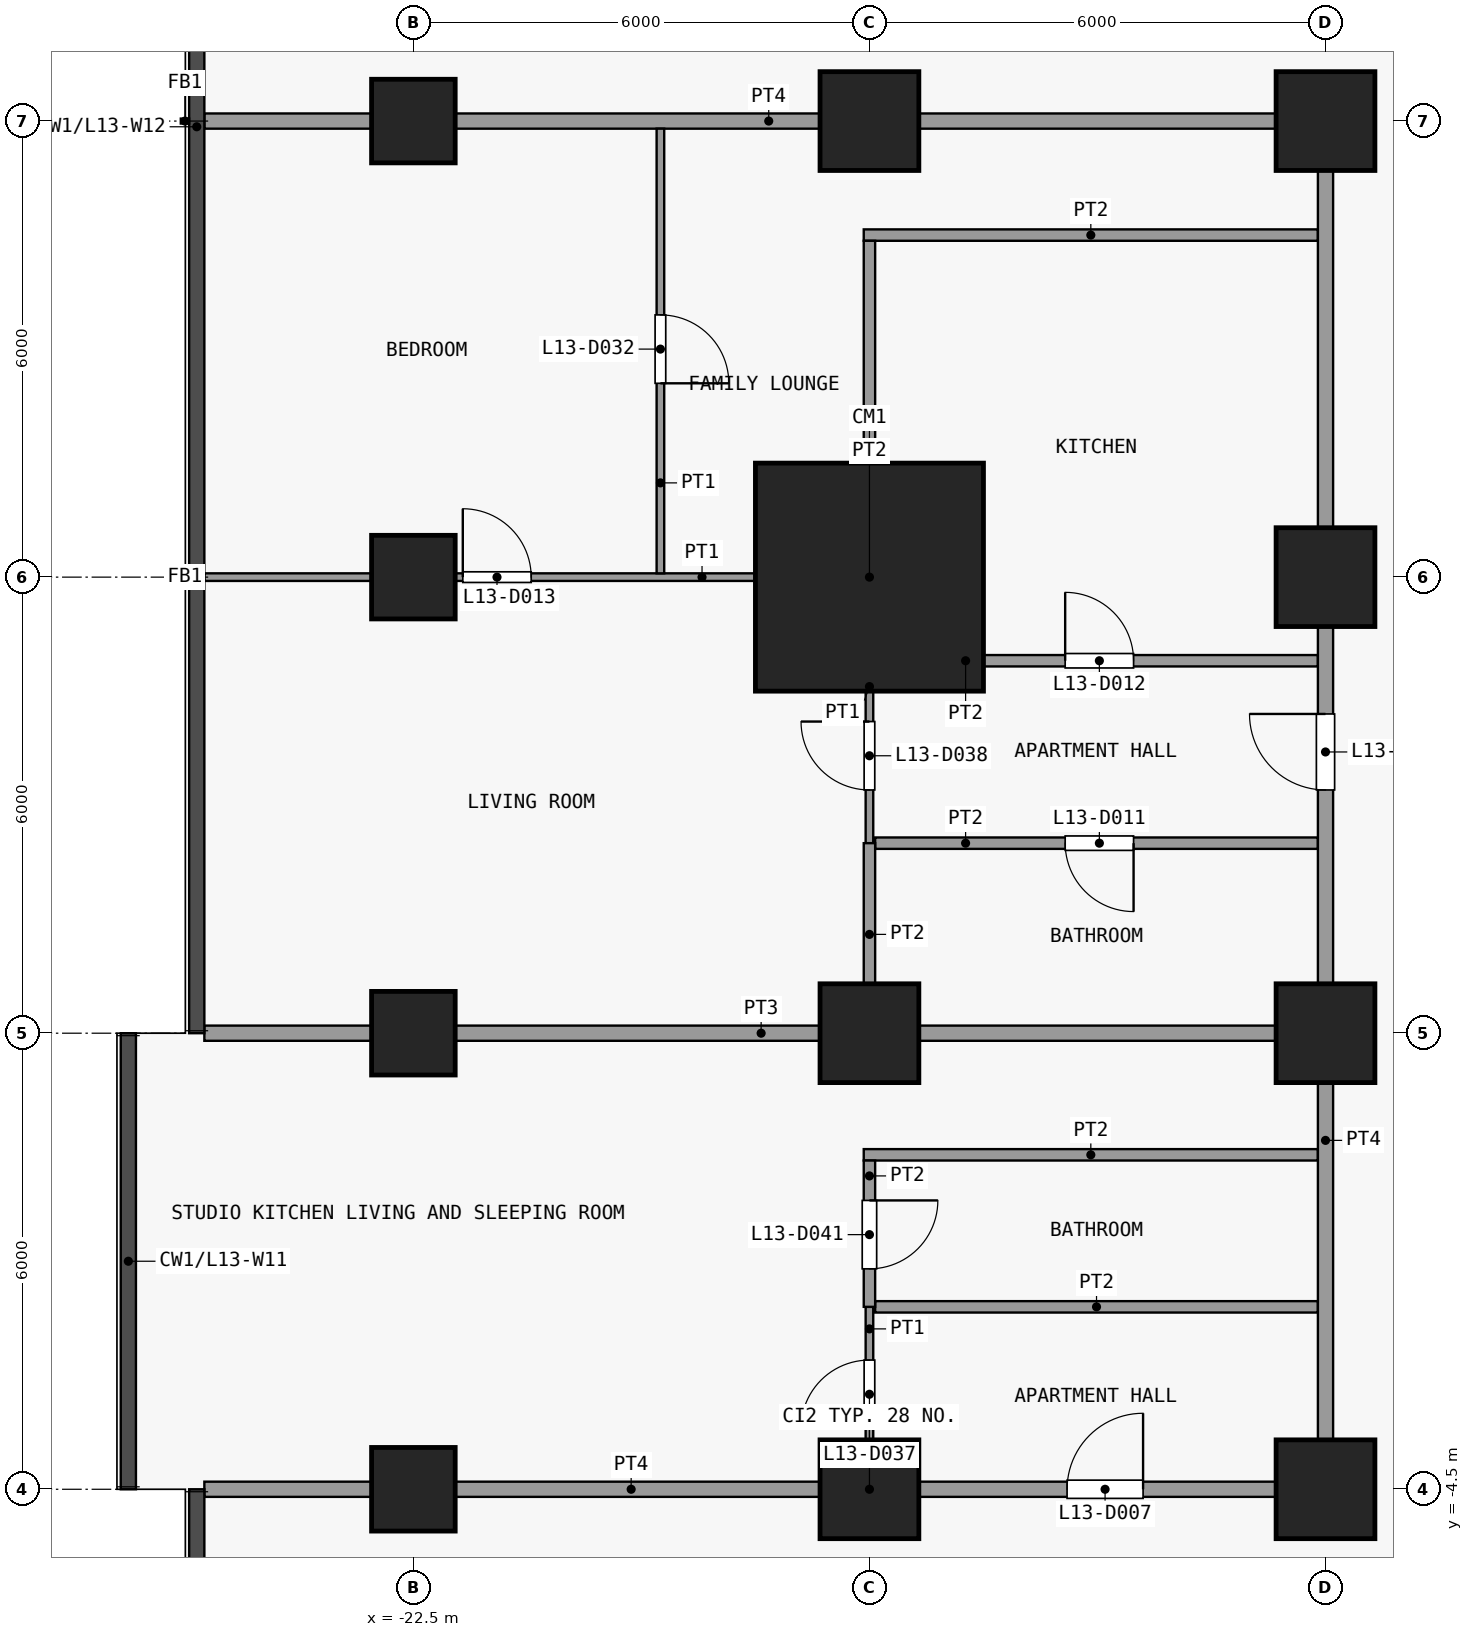
"""IFC4 building model, lengths in metres.
Left out: names, types, materials, properties, quantities, classifications, styles, units other than length and angle.
Written with IfcOpenShell. Run it as: python <this file> out.ifc"""

import sys

from ifc_helpers import new_model, si_unit, direction, frame, frame_2d, origin, origin_2d, place, context, subcontext, project, spatial, rectangle, extrude, element, fill, save


model = new_model("IFC4")
c1 = context("Model", 3, precision=1e-05, world=origin(), true_north=direction((0.0, 1.0)))
c2 = subcontext(c1, "Body", "Model", "MODEL_VIEW")
j1 = project(units=[si_unit("LENGTHUNIT", "METRE"), si_unit("PLANEANGLEUNIT", "RADIAN")], contexts=[c1])
p1 = place(None, origin())
s1 = spatial("IfcSite", under=j1, at=p1, CompositionType="ELEMENT")
p2 = place(p1, origin())
s2 = spatial("IfcBuilding", under=s1, at=p2, CompositionType="ELEMENT")
p3 = place(p2, frame((0.0, 0.0, 57.7)))
s3 = spatial("IfcBuildingStorey", under=s2, at=p3, CompositionType="ELEMENT", Elevation=57.7)
for number, where, z_axis, x_axis in (
    (1, (-22.5, -4.5, 0.0), (0.0, 0.0, 1.0), (1.0, 0.0, 0.0)),
    (2, (-22.5, 1.5, 0.0), (0.0, 0.0, 1.0), (1.0, 0.0, 0.0)),
    (3, (-22.5, 7.5, 0.0), (0.0, 0.0, 1.0), (1.0, 0.0, 0.0)),
    (4, (-22.5, 13.5, 0.0), (0.0, 0.0, 1.0), (1.0, 0.0, 0.0)),
):
    element("IfcColumn", number, at=place(p3, frame(where, z_axis=z_axis, x_axis=x_axis)), inside=s3, PredefinedType="COLUMN", context=c2, shape_type="SweptSolid", body=[
        extrude(rectangle(XDim=1.1, YDim=1.1, at=origin_2d()), origin(), (0.0, 0.0, 1.0), 3.6),
    ])
for number, where, z_axis, x_axis in (
    (5, (-16.5, -4.5, 0.0), (0.0, 0.0, 1.0), (1.0, 0.0, 0.0)),
    (6, (-16.5, 1.5, 0.0), (0.0, 0.0, 1.0), (1.0, 0.0, 0.0)),
):
    element("IfcColumn", number, at=place(p3, frame(where, z_axis=z_axis, x_axis=x_axis)), inside=s3, PredefinedType="COLUMN", context=c2, shape_type="SweptSolid", body=[
        extrude(rectangle(XDim=1.3, YDim=1.3, at=origin_2d()), origin(), (0.0, 0.0, 1.0), 3.6),
    ])
p4 = place(p3, frame((-16.5, 7.5, 0.0), z_axis=(0.0, 0.0, 1.0), x_axis=(1.0, 0.0, 0.0)))
e7 = element("IfcColumn", 7, at=p4, inside=s3, PredefinedType="COLUMN", context=c2, shape_type="SweptSolid", body=[
    extrude(rectangle(XDim=3.0, YDim=3.0, at=origin_2d()), origin(), (0.0, 0.0, 1.0), 3.6),
])
for number, where, z_axis, x_axis in (
    (8, (-16.5, 13.5, 0.0), (0.0, 0.0, 1.0), (1.0, 0.0, 0.0)),
    (9, (-10.5, -4.5, 0.0), (0.0, 0.0, 1.0), (1.0, 0.0, 0.0)),
    (10, (-10.5, 1.5, 0.0), (0.0, 0.0, 1.0), (1.0, 0.0, 0.0)),
    (11, (-10.5, 7.5, 0.0), (0.0, 0.0, 1.0), (1.0, 0.0, 0.0)),
    (12, (-10.5, 13.5, 0.0), (0.0, 0.0, 1.0), (1.0, 0.0, 0.0)),
):
    element("IfcColumn", number, at=place(p3, frame(where, z_axis=z_axis, x_axis=x_axis)), inside=s3, PredefinedType="COLUMN", context=c2, shape_type="SweptSolid", body=[
        extrude(rectangle(XDim=1.3, YDim=1.3, at=origin_2d()), origin(), (0.0, 0.0, 1.0), 3.6),
    ])
p5 = place(p3, frame((-25.25, -4.5, 0.0), z_axis=(0.0, 0.0, 1.0), x_axis=(1.0, 0.0, 0.0)))
e13 = element("IfcWall", 13, at=p5, inside=s3, PredefinedType="PARTITIONING", context=c2, shape_type="SweptSolid", body=[
    extrude(rectangle(XDim=14.85, YDim=0.2, at=frame_2d((7.425, 0.0))), origin(), (0.0, 0.0, 1.0), 3.3),
])
p6 = place(p5, frame((11.35, 0.0, 0.0)))
e14 = element("IfcOpeningElement", 14, at=p6, cuts=e13, PredefinedType="OPENING", context=c2, shape_type="SweptSolid", body=[
    extrude(rectangle(XDim=1.0, YDim=2.1, at=frame_2d((0.5, 1.05))), frame((0.0, 0.11, 0.0), z_axis=(0.0, -1.0, 0.0), x_axis=(1.0, 0.0, 0.0)), (0.0, 0.0, 1.0), 0.22),
])
p7 = place(p3, frame((-16.425, -2.1, 0.0), z_axis=(0.0, 0.0, 1.0), x_axis=(1.0, 0.0, 0.0)))
e15 = element("IfcWall", 15, at=p7, inside=s3, PredefinedType="PARTITIONING", context=c2, shape_type="SweptSolid", body=[
    extrude(rectangle(XDim=5.825, YDim=0.15, at=frame_2d((2.913, 0.0))), origin(), (0.0, 0.0, 1.0), 3.3),
])
p8 = place(p3, frame((-16.575, -0.1, 0.0), z_axis=(0.0, 0.0, 1.0), x_axis=(1.0, 0.0, 0.0)))
e16 = element("IfcWall", 16, at=p8, inside=s3, PredefinedType="PARTITIONING", context=c2, shape_type="SweptSolid", body=[
    extrude(rectangle(XDim=5.975, YDim=0.15, at=frame_2d((2.987, 0.0))), origin(), (0.0, 0.0, 1.0), 3.3),
])
p9 = place(p3, frame((-25.25, 1.5, 0.0), z_axis=(0.0, 0.0, 1.0), x_axis=(1.0, 0.0, 0.0)))
e17 = element("IfcWall", 17, at=p9, inside=s3, PredefinedType="PARTITIONING", context=c2, shape_type="SweptSolid", body=[
    extrude(rectangle(XDim=14.65, YDim=0.2, at=frame_2d((7.325, 0.0))), origin(), (0.0, 0.0, 1.0), 3.3),
])
p10 = place(p3, frame((-16.425, 4.0, 0.0), z_axis=(0.0, 0.0, 1.0), x_axis=(1.0, 0.0, 0.0)))
e18 = element("IfcWall", 18, at=p10, inside=s3, PredefinedType="PARTITIONING", context=c2, shape_type="SweptSolid", body=[
    extrude(rectangle(XDim=5.825, YDim=0.15, at=frame_2d((2.913, 0.0))), origin(), (0.0, 0.0, 1.0), 3.3),
])
p11 = place(p10, frame((2.5, 0.0, 0.0)))
e19 = element("IfcOpeningElement", 19, at=p11, cuts=e18, PredefinedType="OPENING", context=c2, shape_type="SweptSolid", body=[
    extrude(rectangle(XDim=0.9, YDim=2.1, at=frame_2d((0.45, 1.05))), frame((0.0, 0.085, 0.0), z_axis=(0.0, -1.0, 0.0), x_axis=(1.0, 0.0, 0.0)), (0.0, 0.0, 1.0), 0.17),
])
p12 = place(p3, frame((-16.425, 6.4, 0.0), z_axis=(0.0, 0.0, 1.0), x_axis=(1.0, 0.0, 0.0)))
e20 = element("IfcWall", 20, at=p12, inside=s3, PredefinedType="PARTITIONING", context=c2, shape_type="SweptSolid", body=[
    extrude(rectangle(XDim=5.825, YDim=0.15, at=frame_2d((2.913, 0.0))), origin(), (0.0, 0.0, 1.0), 3.3),
])
p13 = place(p12, frame((2.5, 0.0, 0.0)))
e21 = element("IfcOpeningElement", 21, at=p13, cuts=e20, PredefinedType="OPENING", context=c2, shape_type="SweptSolid", body=[
    extrude(rectangle(XDim=0.9, YDim=2.1, at=frame_2d((0.45, 1.05))), frame((0.0, 0.085, 0.0), z_axis=(0.0, -1.0, 0.0), x_axis=(1.0, 0.0, 0.0)), (0.0, 0.0, 1.0), 0.17),
])
p14 = place(p3, frame((-25.25, 7.5, 0.0), z_axis=(0.0, 0.0, 1.0), x_axis=(1.0, 0.0, 0.0)))
e22 = element("IfcWall", 22, at=p14, inside=s3, PredefinedType="PARTITIONING", context=c2, shape_type="SweptSolid", body=[
    extrude(rectangle(XDim=8.675, YDim=0.1, at=frame_2d((4.337, 0.0))), origin(), (0.0, 0.0, 1.0), 3.3),
])
p15 = place(p14, frame((3.4, 0.0, 0.0)))
e23 = element("IfcOpeningElement", 23, at=p15, cuts=e22, PredefinedType="OPENING", context=c2, shape_type="SweptSolid", body=[
    extrude(rectangle(XDim=0.9, YDim=2.1, at=frame_2d((0.45, 1.05))), frame((0.0, 0.06, 0.0), z_axis=(0.0, -1.0, 0.0), x_axis=(1.0, 0.0, 0.0)), (0.0, 0.0, 1.0), 0.12),
])
p16 = place(p3, frame((-16.575, 12.0, 0.0), z_axis=(0.0, 0.0, 1.0), x_axis=(1.0, 0.0, 0.0)))
e24 = element("IfcWall", 24, at=p16, inside=s3, PredefinedType="PARTITIONING", context=c2, shape_type="SweptSolid", body=[
    extrude(rectangle(XDim=5.975, YDim=0.15, at=frame_2d((2.987, 0.0))), origin(), (0.0, 0.0, 1.0), 3.3),
])
p17 = place(p3, frame((-25.25, 13.5, 0.0), z_axis=(0.0, 0.0, 1.0), x_axis=(1.0, 0.0, 0.0)))
e25 = element("IfcWall", 25, at=p17, inside=s3, PredefinedType="PARTITIONING", context=c2, shape_type="SweptSolid", body=[
    extrude(rectangle(XDim=14.85, YDim=0.2, at=frame_2d((7.425, 0.0))), origin(), (0.0, 0.0, 1.0), 3.3),
])
p18 = place(p3, frame((-19.25, 7.55, 0.0), z_axis=(0.0, 0.0, 1.0), x_axis=(0.0, 1.0, 0.0)))
e26 = element("IfcWall", 26, at=p18, inside=s3, PredefinedType="PARTITIONING", context=c2, shape_type="SweptSolid", body=[
    extrude(rectangle(XDim=5.85, YDim=0.1, at=frame_2d((2.925, 0.0))), origin(), (0.0, 0.0, 1.0), 3.3),
])
p19 = place(p18, frame((2.5, 0.0, 0.0)))
e27 = element("IfcOpeningElement", 27, at=p19, cuts=e26, PredefinedType="OPENING", context=c2, shape_type="SweptSolid", body=[
    extrude(rectangle(XDim=0.9, YDim=2.1, at=frame_2d((0.45, 1.05))), frame((0.0, 0.06, 0.0), z_axis=(0.0, -1.0, 0.0), x_axis=(1.0, 0.0, 0.0)), (0.0, 0.0, 1.0), 0.12),
])
p20 = place(p3, frame((-16.5, -4.4, 0.0), z_axis=(0.0, 0.0, 1.0), x_axis=(0.0, 1.0, 0.0)))
e28 = element("IfcWall", 28, at=p20, inside=s3, PredefinedType="PARTITIONING", context=c2, shape_type="SweptSolid", body=[
    extrude(rectangle(XDim=2.3, YDim=0.1, at=frame_2d((1.15, 0.0))), origin(), (0.0, 0.0, 1.0), 3.3),
])
p21 = place(p20, frame((0.7, 0.0, 0.0)))
e29 = element("IfcOpeningElement", 29, at=p21, cuts=e28, PredefinedType="OPENING", context=c2, shape_type="SweptSolid", body=[
    extrude(rectangle(XDim=0.9, YDim=2.1, at=frame_2d((0.45, 1.05))), frame((0.0, 0.06, 0.0), z_axis=(0.0, -1.0, 0.0), x_axis=(1.0, 0.0, 0.0)), (0.0, 0.0, 1.0), 0.12),
])
p22 = place(p3, frame((-16.5, 4.0, 0.0), z_axis=(0.0, 0.0, 1.0), x_axis=(0.0, 1.0, 0.0)))
e30 = element("IfcWall", 30, at=p22, inside=s3, PredefinedType="PARTITIONING", context=c2, shape_type="SweptSolid", body=[
    extrude(rectangle(XDim=2.4, YDim=0.1, at=frame_2d((1.2, 0.0))), origin(), (0.0, 0.0, 1.0), 3.3),
])
p23 = place(p22, frame((0.7, 0.0, 0.0)))
e31 = element("IfcOpeningElement", 31, at=p23, cuts=e30, PredefinedType="OPENING", context=c2, shape_type="SweptSolid", body=[
    extrude(rectangle(XDim=0.9, YDim=2.1, at=frame_2d((0.45, 1.05))), frame((0.0, 0.06, 0.0), z_axis=(0.0, -1.0, 0.0), x_axis=(1.0, 0.0, 0.0)), (0.0, 0.0, 1.0), 0.12),
])
p24 = place(p3, frame((-16.5, -2.1, 0.0), z_axis=(0.0, 0.0, 1.0), x_axis=(0.0, 1.0, 0.0)))
e32 = element("IfcWall", 32, at=p24, inside=s3, PredefinedType="PARTITIONING", context=c2, shape_type="SweptSolid", body=[
    extrude(rectangle(XDim=1.925, YDim=0.15, at=frame_2d((0.962, 0.0))), origin(), (0.0, 0.0, 1.0), 3.3),
])
p25 = place(p24, frame((0.5, 0.0, 0.0)))
e33 = element("IfcOpeningElement", 33, at=p25, cuts=e32, PredefinedType="OPENING", context=c2, shape_type="SweptSolid", body=[
    extrude(rectangle(XDim=0.9, YDim=2.1, at=frame_2d((0.45, 1.05))), frame((0.0, 0.085, 0.0), z_axis=(0.0, -1.0, 0.0), x_axis=(1.0, 0.0, 0.0)), (0.0, 0.0, 1.0), 0.17),
])
p26 = place(p3, frame((-16.5, 1.6, 0.0), z_axis=(0.0, 0.0, 1.0), x_axis=(0.0, 1.0, 0.0)))
e34 = element("IfcWall", 34, at=p26, inside=s3, PredefinedType="PARTITIONING", context=c2, shape_type="SweptSolid", body=[
    extrude(rectangle(XDim=2.4, YDim=0.15, at=frame_2d((1.2, 0.0))), origin(), (0.0, 0.0, 1.0), 3.3),
])
p27 = place(p3, frame((-16.5, 6.4, 0.0), z_axis=(0.0, 0.0, 1.0), x_axis=(0.0, 1.0, 0.0)))
e35 = element("IfcWall", 35, at=p27, inside=s3, PredefinedType="PARTITIONING", context=c2, shape_type="SweptSolid", body=[
    extrude(rectangle(XDim=5.525, YDim=0.15, at=frame_2d((2.763, 0.0))), origin(), (0.0, 0.0, 1.0), 3.3),
])
p28 = place(p3, frame((-10.5, -4.4, 0.0), z_axis=(0.0, 0.0, 1.0), x_axis=(0.0, 1.0, 0.0)))
e36 = element("IfcWall", 36, at=p28, inside=s3, PredefinedType="PARTITIONING", context=c2, shape_type="SweptSolid", body=[
    extrude(rectangle(XDim=17.8, YDim=0.2, at=frame_2d((8.9, 0.0))), origin(), (0.0, 0.0, 1.0), 3.3),
])
p29 = place(p28, frame((9.1, 0.0, 0.0)))
e37 = element("IfcOpeningElement", 37, at=p29, cuts=e36, PredefinedType="OPENING", context=c2, shape_type="SweptSolid", body=[
    extrude(rectangle(XDim=1.0, YDim=2.1, at=frame_2d((0.5, 1.05))), frame((0.0, 0.11, 0.0), z_axis=(0.0, -1.0, 0.0), x_axis=(1.0, 0.0, 0.0)), (0.0, 0.0, 1.0), 0.22),
])
p30 = place(p6, origin())
e38 = element("IfcDoor", 38, at=p30, inside=s3, OperationType="SINGLE_SWING_LEFT", PredefinedType="DOOR", context=c2, shape_type="SweptSolid", body=[
    extrude(rectangle(XDim=1.0, YDim=2.1, at=frame_2d((0.5, 1.05))), frame((0.0, 0.025, 0.0), z_axis=(0.0, -1.0, 0.0), x_axis=(1.0, 0.0, 0.0)), (0.0, 0.0, 1.0), 0.05),
])
fill(e14, e38)
p31 = place(p11, origin())
e39 = element("IfcDoor", 39, at=p31, inside=s3, OperationType="SINGLE_SWING_RIGHT", PredefinedType="DOOR", context=c2, shape_type="SweptSolid", body=[
    extrude(rectangle(XDim=0.9, YDim=2.1, at=frame_2d((0.45, 1.05))), frame((0.0, 0.025, 0.0), z_axis=(0.0, -1.0, 0.0), x_axis=(1.0, 0.0, 0.0)), (0.0, 0.0, 1.0), 0.05),
])
fill(e19, e39)
p32 = place(p13, origin())
e40 = element("IfcDoor", 40, at=p32, inside=s3, OperationType="SINGLE_SWING_RIGHT", PredefinedType="DOOR", context=c2, shape_type="SweptSolid", body=[
    extrude(rectangle(XDim=0.9, YDim=2.1, at=frame_2d((0.45, 1.05))), frame((0.0, 0.025, 0.0), z_axis=(0.0, -1.0, 0.0), x_axis=(1.0, 0.0, 0.0)), (0.0, 0.0, 1.0), 0.05),
])
fill(e21, e40)
p33 = place(p15, origin())
e41 = element("IfcDoor", 41, at=p33, inside=s3, OperationType="SINGLE_SWING_RIGHT", PredefinedType="DOOR", context=c2, shape_type="SweptSolid", body=[
    extrude(rectangle(XDim=0.9, YDim=2.1, at=frame_2d((0.45, 1.05))), frame((0.0, 0.025, 0.0), z_axis=(0.0, -1.0, 0.0), x_axis=(1.0, 0.0, 0.0)), (0.0, 0.0, 1.0), 0.05),
])
fill(e23, e41)
p34 = place(p19, origin())
e42 = element("IfcDoor", 42, at=p34, inside=s3, OperationType="SINGLE_SWING_LEFT", PredefinedType="DOOR", context=c2, shape_type="SweptSolid", body=[
    extrude(rectangle(XDim=0.9, YDim=2.1, at=frame_2d((0.45, 1.05))), frame((0.0, 0.025, 0.0), z_axis=(0.0, -1.0, 0.0), x_axis=(1.0, 0.0, 0.0)), (0.0, 0.0, 1.0), 0.05),
])
fill(e27, e42)
p35 = place(p21, origin())
e43 = element("IfcDoor", 43, at=p35, inside=s3, OperationType="SINGLE_SWING_RIGHT", PredefinedType="DOOR", context=c2, shape_type="SweptSolid", body=[
    extrude(rectangle(XDim=0.9, YDim=2.1, at=frame_2d((0.45, 1.05))), frame((0.0, 0.025, 0.0), z_axis=(0.0, -1.0, 0.0), x_axis=(1.0, 0.0, 0.0)), (0.0, 0.0, 1.0), 0.05),
])
fill(e29, e43)
p36 = place(p23, origin())
e44 = element("IfcDoor", 44, at=p36, inside=s3, OperationType="SINGLE_SWING_LEFT", PredefinedType="DOOR", context=c2, shape_type="SweptSolid", body=[
    extrude(rectangle(XDim=0.9, YDim=2.1, at=frame_2d((0.45, 1.05))), frame((0.0, 0.025, 0.0), z_axis=(0.0, -1.0, 0.0), x_axis=(1.0, 0.0, 0.0)), (0.0, 0.0, 1.0), 0.05),
])
fill(e31, e44)
p37 = place(p25, origin())
e45 = element("IfcDoor", 45, at=p37, inside=s3, OperationType="SINGLE_SWING_RIGHT", PredefinedType="DOOR", context=c2, shape_type="SweptSolid", body=[
    extrude(rectangle(XDim=0.9, YDim=2.1, at=frame_2d((0.45, 1.05))), frame((0.0, 0.025, 0.0), z_axis=(0.0, -1.0, 0.0), x_axis=(1.0, 0.0, 0.0)), (0.0, 0.0, 1.0), 0.05),
])
fill(e33, e45)
p38 = place(p29, origin())
e46 = element("IfcDoor", 46, at=p38, inside=s3, OperationType="SINGLE_SWING_LEFT", PredefinedType="DOOR", context=c2, shape_type="SweptSolid", body=[
    extrude(rectangle(XDim=1.0, YDim=2.1, at=frame_2d((0.5, 1.05))), frame((0.0, 0.025, 0.0), z_axis=(0.0, -1.0, 0.0), x_axis=(1.0, 0.0, 0.0)), (0.0, 0.0, 1.0), 0.05),
])
fill(e37, e46)
save(model, sys.argv[1])
